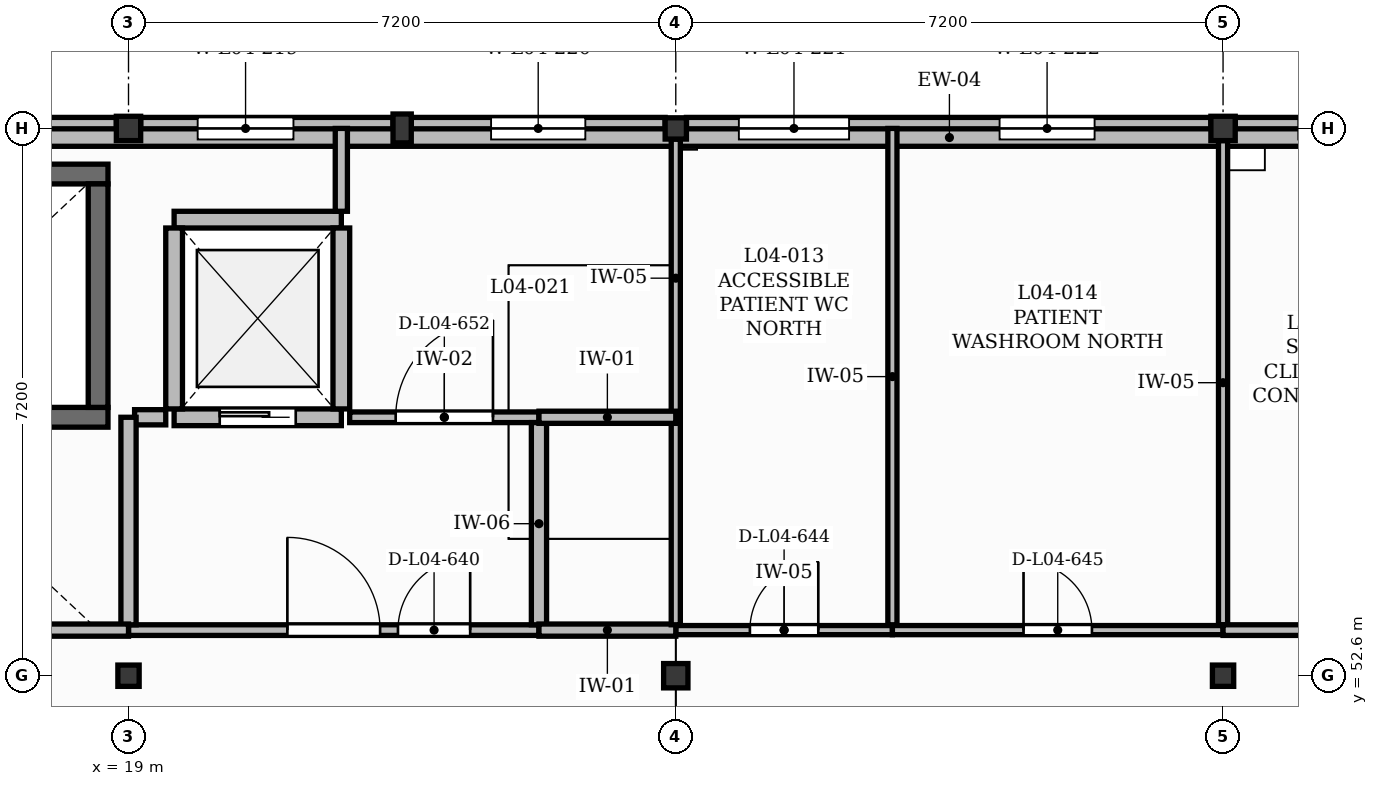
"""IFC4 building model, lengths in metres.
Left out: names, types, materials, properties, quantities, classifications, styles, units other than length and angle.
Written with IfcOpenShell. Run it as: python <this file> out.ifc"""

import sys

from ifc_helpers import new_model, si_unit, direction, frame, frame_2d, origin, origin_2d, place, context, subcontext, project, spatial, polyline, rectangle, outline, extrude, element, fill, save


model = new_model("IFC4")
c1 = context("Model", 3, precision=1e-05, world=origin(), true_north=direction((0.0, 1.0)))
c2 = subcontext(c1, "Body", "Model", "MODEL_VIEW")
j1 = project(units=[si_unit("LENGTHUNIT", "METRE"), si_unit("PLANEANGLEUNIT", "RADIAN")], contexts=[c1])
p1 = place(None, origin())
s1 = spatial("IfcSite", under=j1, at=p1, CompositionType="ELEMENT")
p2 = place(p1, origin())
s2 = spatial("IfcBuilding", under=s1, at=p2, CompositionType="ELEMENT")
p3 = place(p2, frame((0.0, 0.0, 17.4)))
s3 = spatial("IfcBuildingStorey", under=s2, at=p3, CompositionType="ELEMENT", Elevation=17.4)
p4 = place(p3, frame((19.0, 52.6, 0.0), z_axis=(0.0, 0.0, 1.0), x_axis=(1.0, 0.0, 0.0)))
e1 = element("IfcColumn", 1, at=p4, inside=s3, PredefinedType="COLUMN", context=c2, shape_type="SweptSolid", body=[
    extrude(rectangle(XDim=0.28, YDim=0.28, at=origin_2d()), origin(), (0.0, 0.0, 1.0), 3.95),
])
for number, where, z_axis, x_axis in (
    (2, (19.0, 59.8, 0.0), (0.0, 0.0, 1.0), (1.0, 0.0, 0.0)),
    (3, (26.2, 52.6, 0.0), (0.0, 0.0, 1.0), (1.0, 0.0, 0.0)),
):
    element("IfcColumn", number, at=place(p3, frame(where, z_axis=z_axis, x_axis=x_axis)), inside=s3, PredefinedType="COLUMN", context=c2, shape_type="SweptSolid", body=[
        extrude(rectangle(XDim=0.32, YDim=0.32, at=origin_2d()), origin(), (0.0, 0.0, 1.0), 3.95),
    ])
for number, where, z_axis, x_axis in (
    (4, (26.2, 59.8, 0.0), (0.0, 0.0, 1.0), (1.0, 0.0, 0.0)),
    (5, (33.4, 52.6, 0.0), (0.0, 0.0, 1.0), (1.0, 0.0, 0.0)),
):
    element("IfcColumn", number, at=place(p3, frame(where, z_axis=z_axis, x_axis=x_axis)), inside=s3, PredefinedType="COLUMN", context=c2, shape_type="SweptSolid", body=[
        extrude(rectangle(XDim=0.28, YDim=0.28, at=origin_2d()), origin(), (0.0, 0.0, 1.0), 3.95),
    ])
p5 = place(p3, frame((33.4, 59.8, 0.0), z_axis=(0.0, 0.0, 1.0), x_axis=(1.0, 0.0, 0.0)))
e6 = element("IfcColumn", 6, at=p5, inside=s3, PredefinedType="COLUMN", context=c2, shape_type="SweptSolid", body=[
    extrude(rectangle(XDim=0.32, YDim=0.32, at=origin_2d()), origin(), (0.0, 0.0, 1.0), 3.95),
])
p6 = place(p3, frame((22.6, 59.8, 0.0), z_axis=(0.0, 0.0, 1.0), x_axis=(1.0, 0.0, 0.0)))
e7 = element("IfcColumn", 7, at=p6, inside=s3, PredefinedType="PILASTER", context=c2, shape_type="SweptSolid", body=[
    extrude(rectangle(XDim=0.24, YDim=0.38, at=origin_2d()), origin(), (0.0, 0.0, 1.0), 3.95),
])
p7 = place(p3, frame((11.94, 59.8, 0.0), z_axis=(0.0, 0.0, 1.0), x_axis=(1.0, 0.0, 0.0)))
e8 = element("IfcWall", 8, at=p7, inside=s3, PredefinedType="SOLIDWALL", context=c2, shape_type="SweptSolid", body=[
    extrude(rectangle(XDim=6.9, YDim=0.29, at=frame_2d((3.45, 0.0))), origin(), (0.0, 0.0, 1.0), 3.49),
])
p8 = place(p3, frame((19.16, 59.8, 0.0), z_axis=(0.0, 0.0, 1.0), x_axis=(1.0, 0.0, 0.0)))
e9 = element("IfcWall", 9, at=p8, inside=s3, PredefinedType="SOLIDWALL", context=c2, shape_type="SweptSolid", body=[
    extrude(rectangle(XDim=3.32, YDim=0.29, at=frame_2d((1.66, 0.0))), origin(), (0.0, 0.0, 1.0), 3.49),
])
p9 = place(p8, frame((0.75, 0.0, 1.05)))
e10 = element("IfcOpeningElement", 10, at=p9, cuts=e9, PredefinedType="OPENING", context=c2, shape_type="SweptSolid", body=[
    extrude(rectangle(XDim=1.26, YDim=1.65, at=frame_2d((0.63, 0.825))), frame((0.0, 0.155, 0.0), z_axis=(0.0, -1.0, 0.0), x_axis=(1.0, 0.0, 0.0)), (0.0, 0.0, 1.0), 0.31),
])
p10 = place(p3, frame((22.72, 59.8, 0.0), z_axis=(0.0, 0.0, 1.0), x_axis=(1.0, 0.0, 0.0)))
e11 = element("IfcWall", 11, at=p10, inside=s3, PredefinedType="SOLIDWALL", context=c2, shape_type="SweptSolid", body=[
    extrude(rectangle(XDim=3.34, YDim=0.29, at=frame_2d((1.67, 0.0))), origin(), (0.0, 0.0, 1.0), 3.49),
])
p11 = place(p10, frame((1.05, 0.0, 1.0)))
e12 = element("IfcOpeningElement", 12, at=p11, cuts=e11, PredefinedType="OPENING", context=c2, shape_type="SweptSolid", body=[
    extrude(rectangle(XDim=1.24, YDim=1.8, at=frame_2d((0.62, 0.9))), frame((0.0, 0.155, 0.0), z_axis=(0.0, -1.0, 0.0), x_axis=(1.0, 0.0, 0.0)), (0.0, 0.0, 1.0), 0.31),
])
p12 = place(p3, frame((26.34, 59.8, 0.0), z_axis=(0.0, 0.0, 1.0), x_axis=(1.0, 0.0, 0.0)))
e13 = element("IfcWall", 13, at=p12, inside=s3, PredefinedType="SOLIDWALL", context=c2, shape_type="SweptSolid", body=[
    extrude(rectangle(XDim=6.9, YDim=0.29, at=frame_2d((3.45, 0.0))), origin(), (0.0, 0.0, 1.0), 3.49),
])
p13 = place(p12, frame((0.69, 0.0, 1.35)))
e14 = element("IfcOpeningElement", 14, at=p13, cuts=e13, PredefinedType="OPENING", context=c2, shape_type="SweptSolid", body=[
    extrude(rectangle(XDim=1.45, YDim=1.4, at=frame_2d((0.725, 0.7))), frame((0.0, 0.155, 0.0), z_axis=(0.0, -1.0, 0.0), x_axis=(1.0, 0.0, 0.0)), (0.0, 0.0, 1.0), 0.31),
])
p14 = place(p12, frame((4.12, 0.0, 1.35)))
e15 = element("IfcOpeningElement", 15, at=p14, cuts=e13, PredefinedType="OPENING", context=c2, shape_type="SweptSolid", body=[
    extrude(rectangle(XDim=1.25, YDim=1.4, at=frame_2d((0.625, 0.7))), frame((0.0, 0.155, 0.0), z_axis=(0.0, -1.0, 0.0), x_axis=(1.0, 0.0, 0.0)), (0.0, 0.0, 1.0), 0.31),
])
p15 = place(p3, frame((33.56, 59.8, 0.0), z_axis=(0.0, 0.0, 1.0), x_axis=(1.0, 0.0, 0.0)))
e16 = element("IfcWall", 16, at=p15, inside=s3, PredefinedType="SOLIDWALL", context=c2, shape_type="SweptSolid", body=[
    extrude(rectangle(XDim=3.32, YDim=0.29, at=frame_2d((1.66, 0.0))), origin(), (0.0, 0.0, 1.0), 3.49),
])
p16 = place(p15, frame((0.83, 0.0, 1.0)))
e17 = element("IfcOpeningElement", 17, at=p16, cuts=e16, PredefinedType="OPENING", context=c2, shape_type="SweptSolid", body=[
    extrude(rectangle(XDim=1.66, YDim=1.8, at=frame_2d((0.83, 0.9))), frame((0.0, 0.155, 0.0), z_axis=(0.0, -1.0, 0.0), x_axis=(1.0, 0.0, 0.0)), (0.0, 0.0, 1.0), 0.31),
])
p17 = place(p3, frame((4.6, 59.68, 4.2), z_axis=(0.0, 0.0, 1.0), x_axis=(1.0, 0.0, 0.0)))
e18 = element("IfcWall", 18, at=p17, inside=s3, PredefinedType="PARAPET", context=c2, shape_type="SweptSolid", body=[
    extrude(outline(polyline([(0.0, 0.0), (50.4, 0.0), (50.4, 0.65), (39.312, 0.925), (39.312, 0.65), (32.256, 1.2), (32.256, 0.925), (18.144, 1.2), (18.144, 0.925), (11.088, 0.925), (11.088, 0.65), (0.0, 0.65), (0.0, 0.0)])), frame((0.0, 0.115, 0.0), z_axis=(0.0, -1.0, 0.0), x_axis=(1.0, 0.0, 0.0)), (0.0, 0.0, 1.0), 0.23),
])
for number, where, z_axis, x_axis in (
    (19, (12.07, 56.0, 0.0), (0.0, 0.0, 1.0), (1.0, 0.0, 0.0)),
    (20, (12.07, 59.2, 0.0), (0.0, 0.0, 1.0), (1.0, 0.0, 0.0)),
):
    element("IfcWall", number, at=place(p3, frame(where, z_axis=z_axis, x_axis=x_axis)), inside=s3, PredefinedType="SHEAR", context=c2, shape_type="SweptSolid", body=[
        extrude(rectangle(XDim=6.66, YDim=0.26, at=frame_2d((3.33, 0.0))), origin(), (0.0, 0.0, 1.0), 3.95),
    ])
p18 = place(p3, frame((18.6, 56.13, 0.0), z_axis=(0.0, 0.0, 1.0), x_axis=(0.0, 1.0, 0.0)))
e21 = element("IfcWall", 21, at=p18, inside=s3, PredefinedType="SHEAR", context=c2, shape_type="SweptSolid", body=[
    extrude(rectangle(XDim=2.94, YDim=0.26, at=frame_2d((1.47, 0.0))), origin(), (0.0, 0.0, 1.0), 3.95),
])
p19 = place(p3, frame((19.6, 56.0, 0.0), z_axis=(0.0, 0.0, 1.0), x_axis=(1.0, 0.0, 0.0)))
e22 = element("IfcWall", 22, at=p19, inside=s3, PredefinedType="SOLIDWALL", context=c2, shape_type="SweptSolid", body=[
    extrude(rectangle(XDim=2.2, YDim=0.22, at=frame_2d((1.1, 0.0))), origin(), (0.0, 0.0, 1.0), 3.95),
])
p20 = place(p19, frame((0.6, 0.0, 0.0)))
e23 = element("IfcOpeningElement", 23, at=p20, cuts=e22, PredefinedType="OPENING", context=c2, shape_type="SweptSolid", body=[
    extrude(rectangle(XDim=1.0, YDim=2.15, at=frame_2d((0.5, 1.075))), frame((0.0, 0.12, 0.0), z_axis=(0.0, -1.0, 0.0), x_axis=(1.0, 0.0, 0.0)), (0.0, 0.0, 1.0), 0.24),
])
p21 = place(p3, frame((19.6, 58.6, 0.0), z_axis=(0.0, 0.0, 1.0), x_axis=(1.0, 0.0, 0.0)))
e24 = element("IfcWall", 24, at=p21, inside=s3, PredefinedType="SOLIDWALL", context=c2, shape_type="SweptSolid", body=[
    extrude(rectangle(XDim=2.2, YDim=0.22, at=frame_2d((1.1, 0.0))), origin(), (0.0, 0.0, 1.0), 3.95),
])
for number, where, z_axis, x_axis in (
    (25, (19.6, 56.11, 0.0), (0.0, 0.0, 1.0), (0.0, 1.0, 0.0)),
    (26, (21.8, 56.11, 0.0), (0.0, 0.0, 1.0), (0.0, 1.0, 0.0)),
):
    element("IfcWall", number, at=place(p3, frame(where, z_axis=z_axis, x_axis=x_axis)), inside=s3, PredefinedType="SOLIDWALL", context=c2, shape_type="SweptSolid", body=[
        extrude(rectangle(XDim=2.38, YDim=0.22, at=frame_2d((1.19, 0.0))), origin(), (0.0, 0.0, 1.0), 3.95),
    ])
p22 = place(p3, frame((19.0, 53.2, 0.0), z_axis=(0.0, 0.0, 1.0), x_axis=(1.0, 0.0, 0.0)))
e27 = element("IfcWall", 27, at=p22, inside=s3, PredefinedType="PARTITIONING", context=c2, shape_type="SweptSolid", body=[
    extrude(rectangle(XDim=5.4, YDim=0.14, at=frame_2d((2.7, 0.0))), origin(), (0.0, 0.0, 1.0), 3.93),
])
p23 = place(p22, frame((2.09, 0.0, 0.0)))
e28 = element("IfcOpeningElement", 28, at=p23, cuts=e27, PredefinedType="OPENING", context=c2, shape_type="SweptSolid", body=[
    extrude(rectangle(XDim=1.22, YDim=2.1, at=frame_2d((0.61, 1.05))), frame((0.0, 0.08, 0.0), z_axis=(0.0, -1.0, 0.0), x_axis=(1.0, 0.0, 0.0)), (0.0, 0.0, 1.0), 0.16),
])
p24 = place(p22, frame((3.545, 0.0, 0.0)))
e29 = element("IfcOpeningElement", 29, at=p24, cuts=e27, PredefinedType="OPENING", context=c2, shape_type="SweptSolid", body=[
    extrude(rectangle(XDim=0.95, YDim=2.1, at=frame_2d((0.475, 1.05))), frame((0.0, 0.08, 0.0), z_axis=(0.0, -1.0, 0.0), x_axis=(1.0, 0.0, 0.0)), (0.0, 0.0, 1.0), 0.16),
])
p25 = place(p3, frame((21.91, 56.0, 0.0), z_axis=(0.0, 0.0, 1.0), x_axis=(1.0, 0.0, 0.0)))
e30 = element("IfcWall", 30, at=p25, inside=s3, PredefinedType="PARTITIONING", context=c2, shape_type="SweptSolid", body=[
    extrude(rectangle(XDim=2.49, YDim=0.14, at=frame_2d((1.245, 0.0))), origin(), (0.0, 0.0, 1.0), 3.93),
])
p26 = place(p25, frame((0.605, 0.0, 0.0)))
e31 = element("IfcOpeningElement", 31, at=p26, cuts=e30, PredefinedType="OPENING", context=c2, shape_type="SweptSolid", body=[
    extrude(rectangle(XDim=1.28, YDim=2.2, at=frame_2d((0.64, 1.1))), frame((0.0, 0.08, 0.0), z_axis=(0.0, -1.0, 0.0), x_axis=(1.0, 0.0, 0.0)), (0.0, 0.0, 1.0), 0.16),
])
p27 = place(p3, frame((26.2, 53.2, 0.0), z_axis=(0.0, 0.0, 1.0), x_axis=(1.0, 0.0, 0.0)))
e32 = element("IfcWall", 32, at=p27, inside=s3, PredefinedType="PLUMBINGWALL", context=c2, shape_type="SweptSolid", body=[
    extrude(rectangle(XDim=2.85, YDim=0.12, at=frame_2d((1.425, 0.0))), origin(), (0.0, 0.0, 1.0), 3.93),
])
p28 = place(p27, frame((0.975, 0.0, 0.0)))
e33 = element("IfcOpeningElement", 33, at=p28, cuts=e32, PredefinedType="OPENING", context=c2, shape_type="SweptSolid", body=[
    extrude(rectangle(XDim=0.9, YDim=2.1, at=frame_2d((0.45, 1.05))), frame((0.0, 0.07, 0.0), z_axis=(0.0, -1.0, 0.0), x_axis=(1.0, 0.0, 0.0)), (0.0, 0.0, 1.0), 0.14),
])
p29 = place(p3, frame((26.2, 56.0, 0.0), z_axis=(0.0, 0.0, 1.0), x_axis=(0.0, 1.0, 0.0)))
e34 = element("IfcWall", 34, at=p29, inside=s3, PredefinedType="PLUMBINGWALL", context=c2, shape_type="SweptSolid", body=[
    extrude(rectangle(XDim=3.66, YDim=0.12, at=frame_2d((1.83, 0.0))), origin(), (0.0, 0.0, 1.0), 3.49),
])
p30 = place(p3, frame((29.05, 53.27, 0.0), z_axis=(0.0, 0.0, 1.0), x_axis=(0.0, 1.0, 0.0)))
e35 = element("IfcWall", 35, at=p30, inside=s3, PredefinedType="PLUMBINGWALL", context=c2, shape_type="SweptSolid", body=[
    extrude(rectangle(XDim=6.53, YDim=0.12, at=frame_2d((3.265, 0.0))), origin(), (0.0, 0.0, 1.0), 3.93),
])
p31 = place(p3, frame((29.05, 53.2, 0.0), z_axis=(0.0, 0.0, 1.0), x_axis=(1.0, 0.0, 0.0)))
e36 = element("IfcWall", 36, at=p31, inside=s3, PredefinedType="PLUMBINGWALL", context=c2, shape_type="SweptSolid", body=[
    extrude(rectangle(XDim=4.35, YDim=0.12, at=frame_2d((2.175, 0.0))), origin(), (0.0, 0.0, 1.0), 3.93),
])
p32 = place(p31, frame((1.725, 0.0, 0.0)))
e37 = element("IfcOpeningElement", 37, at=p32, cuts=e36, PredefinedType="OPENING", context=c2, shape_type="SweptSolid", body=[
    extrude(rectangle(XDim=0.9, YDim=2.1, at=frame_2d((0.45, 1.05))), frame((0.0, 0.07, 0.0), z_axis=(0.0, -1.0, 0.0), x_axis=(1.0, 0.0, 0.0)), (0.0, 0.0, 1.0), 0.14),
])
p33 = place(p3, frame((33.4, 53.27, 0.0), z_axis=(0.0, 0.0, 1.0), x_axis=(0.0, 1.0, 0.0)))
e38 = element("IfcWall", 38, at=p33, inside=s3, PredefinedType="PLUMBINGWALL", context=c2, shape_type="SweptSolid", body=[
    extrude(rectangle(XDim=6.37, YDim=0.12, at=frame_2d((3.185, 0.0))), origin(), (0.0, 0.0, 1.0), 3.49),
])
p34 = place(p3, frame((33.4, 53.2, 0.0), z_axis=(0.0, 0.0, 1.0), x_axis=(1.0, 0.0, 0.0)))
e39 = element("IfcWall", 39, at=p34, inside=s3, PredefinedType="PARTITIONING", context=c2, shape_type="SweptSolid", body=[
    extrude(rectangle(XDim=3.845, YDim=0.14, at=frame_2d((1.923, 0.0))), origin(), (0.0, 0.0, 1.0), 3.93),
])
p35 = place(p34, frame((1.282, 0.0, 0.0)))
e40 = element("IfcOpeningElement", 40, at=p35, cuts=e39, PredefinedType="OPENING", context=c2, shape_type="SweptSolid", body=[
    extrude(rectangle(XDim=1.28, YDim=2.2, at=frame_2d((0.64, 1.1))), frame((0.0, 0.08, 0.0), z_axis=(0.0, -1.0, 0.0), x_axis=(1.0, 0.0, 0.0)), (0.0, 0.0, 1.0), 0.16),
])
p36 = place(p3, frame((24.4, 53.27, 0.0), z_axis=(0.0, 0.0, 1.0), x_axis=(0.0, 1.0, 0.0)))
e41 = element("IfcWall", 41, at=p36, inside=s3, PredefinedType="PARTITIONING", context=c2, shape_type="SweptSolid", body=[
    extrude(rectangle(XDim=2.66, YDim=0.2, at=frame_2d((1.33, 0.0))), origin(), (0.0, 0.0, 1.0), 3.93),
])
p37 = place(p3, frame((19.49, 56.0, 0.0), z_axis=(0.0, 0.0, 1.0), x_axis=(-1.0, 0.0, 0.0)))
e42 = element("IfcWall", 42, at=p37, inside=s3, PredefinedType="PARTITIONING", context=c2, shape_type="SweptSolid", body=[
    extrude(rectangle(XDim=0.41, YDim=0.2, at=frame_2d((0.205, 0.0))), origin(), (0.0, 0.0, 1.0), 3.93),
])
p38 = place(p3, frame((19.0, 53.27, 0.0), z_axis=(0.0, 0.0, 1.0), x_axis=(0.0, 1.0, 0.0)))
e43 = element("IfcWall", 43, at=p38, inside=s3, PredefinedType="PARTITIONING", context=c2, shape_type="SweptSolid", body=[
    extrude(rectangle(XDim=2.73, YDim=0.2, at=frame_2d((1.365, 0.0))), origin(), (0.0, 0.0, 1.0), 3.49),
])
p39 = place(p3, frame((26.2, 53.2, 0.0), z_axis=(0.0, 0.0, 1.0), x_axis=(-1.0, 0.0, 0.0)))
e44 = element("IfcWall", 44, at=p39, inside=s3, PredefinedType="PARTITIONING", context=c2, shape_type="SweptSolid", body=[
    extrude(rectangle(XDim=1.8, YDim=0.16, at=frame_2d((0.9, 0.0))), origin(), (0.0, 0.0, 1.0), 3.93),
])
p40 = place(p3, frame((19.0, 53.2, 0.0), z_axis=(0.0, 0.0, 1.0), x_axis=(-1.0, 0.0, 0.0)))
e45 = element("IfcWall", 45, at=p40, inside=s3, PredefinedType="PARTITIONING", context=c2, shape_type="SweptSolid", body=[
    extrude(rectangle(XDim=2.8, YDim=0.16, at=frame_2d((1.4, 0.0))), origin(), (0.0, 0.0, 1.0), 3.93),
])
p41 = place(p3, frame((26.2, 53.27, 0.0), z_axis=(0.0, 0.0, 1.0), x_axis=(0.0, 1.0, 0.0)))
e46 = element("IfcWall", 46, at=p41, inside=s3, PredefinedType="PLUMBINGWALL", context=c2, shape_type="SweptSolid", body=[
    extrude(rectangle(XDim=2.73, YDim=0.12, at=frame_2d((1.365, 0.0))), origin(), (0.0, 0.0, 1.0), 3.49),
])
p42 = place(p3, frame((24.4, 56.0, 0.0), z_axis=(0.0, 0.0, 1.0), x_axis=(1.0, 0.0, 0.0)))
e47 = element("IfcWall", 47, at=p42, inside=s3, PredefinedType="PARTITIONING", context=c2, shape_type="SweptSolid", body=[
    extrude(rectangle(XDim=1.8, YDim=0.16, at=frame_2d((0.9, 0.0))), origin(), (0.0, 0.0, 1.0), 3.93),
])
p43 = place(p3, frame((21.8, 58.71, 0.0), z_axis=(0.0, 0.0, 1.0), x_axis=(0.0, 1.0, 0.0)))
e48 = element("IfcWall", 48, at=p43, inside=s3, PredefinedType="PARTITIONING", context=c2, shape_type="SweptSolid", body=[
    extrude(rectangle(XDim=1.09, YDim=0.16, at=frame_2d((0.545, 0.0))), origin(), (0.0, 0.0, 1.0), 3.93),
])
p44 = place(p9, origin())
e49 = element("IfcWindow", 49, at=p44, inside=s3, PartitioningType="SINGLE_PANEL", PredefinedType="WINDOW", context=c2, shape_type="SweptSolid", body=[
    extrude(rectangle(XDim=1.26, YDim=1.65, at=frame_2d((0.63, 0.825))), frame((0.0, 0.03, 0.0), z_axis=(0.0, -1.0, 0.0), x_axis=(1.0, 0.0, 0.0)), (0.0, 0.0, 1.0), 0.06),
])
fill(e10, e49)
p45 = place(p11, origin())
e50 = element("IfcWindow", 50, at=p45, inside=s3, PartitioningType="SINGLE_PANEL", PredefinedType="WINDOW", context=c2, shape_type="SweptSolid", body=[
    extrude(rectangle(XDim=1.24, YDim=1.8, at=frame_2d((0.62, 0.9))), frame((0.0, 0.03, 0.0), z_axis=(0.0, -1.0, 0.0), x_axis=(1.0, 0.0, 0.0)), (0.0, 0.0, 1.0), 0.06),
])
fill(e12, e50)
p46 = place(p13, origin())
e51 = element("IfcWindow", 51, at=p46, inside=s3, PartitioningType="SINGLE_PANEL", PredefinedType="WINDOW", context=c2, shape_type="SweptSolid", body=[
    extrude(rectangle(XDim=1.45, YDim=1.4, at=frame_2d((0.725, 0.7))), frame((0.0, 0.03, 0.0), z_axis=(0.0, -1.0, 0.0), x_axis=(1.0, 0.0, 0.0)), (0.0, 0.0, 1.0), 0.06),
])
fill(e14, e51)
p47 = place(p14, origin())
e52 = element("IfcWindow", 52, at=p47, inside=s3, PartitioningType="SINGLE_PANEL", PredefinedType="WINDOW", context=c2, shape_type="SweptSolid", body=[
    extrude(rectangle(XDim=1.25, YDim=1.4, at=frame_2d((0.625, 0.7))), frame((0.0, 0.03, 0.0), z_axis=(0.0, -1.0, 0.0), x_axis=(1.0, 0.0, 0.0)), (0.0, 0.0, 1.0), 0.06),
])
fill(e15, e52)
p48 = place(p16, origin())
e53 = element("IfcWindow", 53, at=p48, inside=s3, PartitioningType="DOUBLE_PANEL_VERTICAL", PredefinedType="WINDOW", context=c2, shape_type="SweptSolid", body=[
    extrude(rectangle(XDim=1.66, YDim=1.8, at=frame_2d((0.83, 0.9))), frame((0.0, 0.03, 0.0), z_axis=(0.0, -1.0, 0.0), x_axis=(1.0, 0.0, 0.0)), (0.0, 0.0, 1.0), 0.06),
])
fill(e17, e53)
p49 = place(p20, origin())
e54 = element("IfcDoor", 54, at=p49, inside=s3, OperationType="SLIDING_TO_LEFT", PredefinedType="DOOR", context=c2, shape_type="SweptSolid", body=[
    extrude(rectangle(XDim=1.0, YDim=2.15, at=frame_2d((0.5, 1.075))), frame((0.0, 0.025, 0.0), z_axis=(0.0, -1.0, 0.0), x_axis=(1.0, 0.0, 0.0)), (0.0, 0.0, 1.0), 0.05),
])
fill(e23, e54)
p50 = place(p23, origin())
e55 = element("IfcDoor", 55, at=p50, inside=s3, OperationType="SINGLE_SWING_LEFT", PredefinedType="DOOR", context=c2, shape_type="SweptSolid", body=[
    extrude(rectangle(XDim=1.22, YDim=2.1, at=frame_2d((0.61, 1.05))), frame((0.0, 0.025, 0.0), z_axis=(0.0, -1.0, 0.0), x_axis=(1.0, 0.0, 0.0)), (0.0, 0.0, 1.0), 0.05),
])
fill(e28, e55)
p51 = place(p24, origin())
e56 = element("IfcDoor", 56, at=p51, inside=s3, OperationType="SINGLE_SWING_RIGHT", PredefinedType="DOOR", context=c2, shape_type="SweptSolid", body=[
    extrude(rectangle(XDim=0.95, YDim=2.1, at=frame_2d((0.475, 1.05))), frame((0.0, 0.025, 0.0), z_axis=(0.0, -1.0, 0.0), x_axis=(1.0, 0.0, 0.0)), (0.0, 0.0, 1.0), 0.05),
])
fill(e29, e56)
p52 = place(p28, origin())
e57 = element("IfcDoor", 57, at=p52, inside=s3, OperationType="SINGLE_SWING_RIGHT", PredefinedType="DOOR", context=c2, shape_type="SweptSolid", body=[
    extrude(rectangle(XDim=0.9, YDim=2.1, at=frame_2d((0.45, 1.05))), frame((0.0, 0.025, 0.0), z_axis=(0.0, -1.0, 0.0), x_axis=(1.0, 0.0, 0.0)), (0.0, 0.0, 1.0), 0.05),
])
fill(e33, e57)
p53 = place(p32, origin())
e58 = element("IfcDoor", 58, at=p53, inside=s3, OperationType="SINGLE_SWING_LEFT", PredefinedType="DOOR", context=c2, shape_type="SweptSolid", body=[
    extrude(rectangle(XDim=0.9, YDim=2.1, at=frame_2d((0.45, 1.05))), frame((0.0, 0.025, 0.0), z_axis=(0.0, -1.0, 0.0), x_axis=(1.0, 0.0, 0.0)), (0.0, 0.0, 1.0), 0.05),
])
fill(e37, e58)
p54 = place(p26, origin())
e59 = element("IfcDoor", 59, at=p54, inside=s3, OperationType="SINGLE_SWING_RIGHT", PredefinedType="DOOR", context=c2, shape_type="SweptSolid", body=[
    extrude(rectangle(XDim=1.28, YDim=2.2, at=frame_2d((0.64, 1.1))), frame((0.0, 0.025, 0.0), z_axis=(0.0, -1.0, 0.0), x_axis=(1.0, 0.0, 0.0)), (0.0, 0.0, 1.0), 0.05),
])
fill(e31, e59)
save(model, sys.argv[1])
